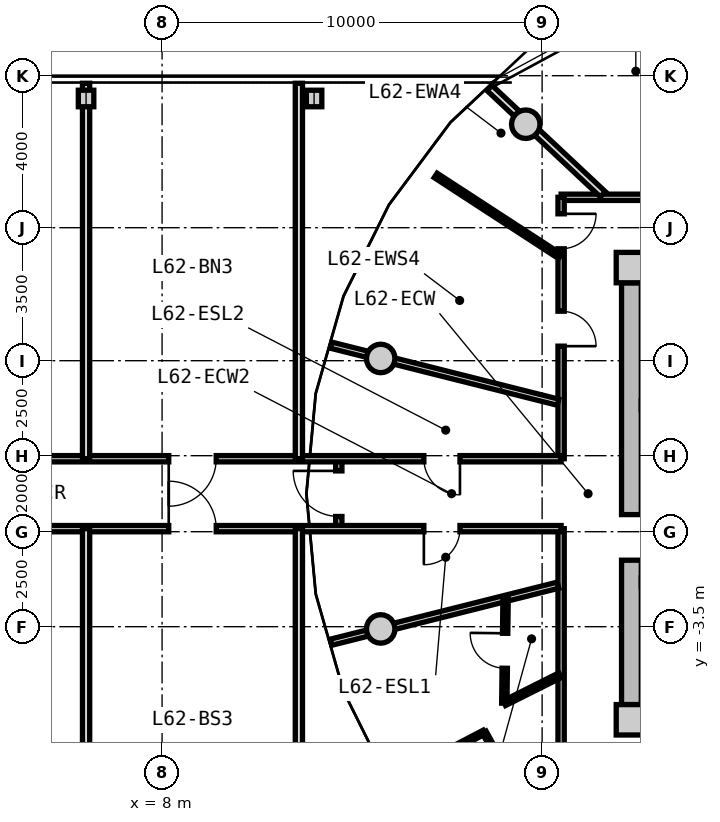
"""IFC4 building model, lengths in metres.
Left out: names, types, materials, properties, quantities, classifications, styles, units other than length and angle.
Written with IfcOpenShell. Run it as: python <this file> out.ifc"""

import sys

from ifc_helpers import new_model, si_unit, direction, frame, frame_2d, origin, origin_2d, place, context, subcontext, project, spatial, rectangle, circle, i_section, extrude, source, transform, mapped, element, fill, save


model = new_model("IFC4")
c1 = context("Model", 3, precision=1e-05, world=origin(), true_north=direction((0.0, 1.0)))
c2 = subcontext(c1, "Body", "Model", "MODEL_VIEW")
j1 = project(units=[si_unit("LENGTHUNIT", "METRE"), si_unit("PLANEANGLEUNIT", "RADIAN")], contexts=[c1])
p1 = place(None, origin())
s1 = spatial("IfcSite", under=j1, at=p1, CompositionType="ELEMENT")
p2 = place(p1, origin())
s2 = spatial("IfcBuilding", under=s1, at=p2, CompositionType="ELEMENT")
p3 = place(p2, frame((0.0, 0.0, 199.8)))
s3 = spatial("IfcBuildingStorey", under=s2, at=p3, CompositionType="ELEMENT", Elevation=199.8)
m1 = source(origin(), c2, "Body", "SweptSolid", [
    extrude(rectangle(XDim=0.8, YDim=0.8, at=origin_2d()), origin(), (0.0, 0.0, 1.0), 4.0),
])
for number, where, z_axis, x_axis in (
    (1, (20.35, -5.95, 0.0), (0.0, 0.0, 1.0), (1.0, 0.0, 0.0)),
    (2, (20.35, 5.95, 0.0), (0.0, 0.0, 1.0), (1.0, 0.0, 0.0)),
):
    element("IfcColumn", number, at=place(p3, frame(where, z_axis=z_axis, x_axis=x_axis)), inside=s3, PredefinedType="COLUMN", context=c2, shape_type="MappedRepresentation", body=[
        mapped(m1, transform((0.0, 0.0, 0.0), x_axis=(1.0, 0.0, 0.0), y_axis=(0.0, 1.0, 0.0), z_axis=(0.0, 0.0, 1.0), scale=1.0)),
    ])
m2 = source(origin(), c2, "Body", "SweptSolid", [
    extrude(rectangle(XDim=11.1, YDim=0.52, at=frame_2d((5.55, 0.0))), origin(), (0.0, 0.0, 1.0), 3.71),
])
p4 = place(p3, frame((20.35, -5.55, 0.0), z_axis=(0.0, 0.0, 1.0), x_axis=(0.0, 1.0, 0.0)))
e3 = element("IfcWall", 3, at=p4, inside=s3, PredefinedType="SHEAR", context=c2, shape_type="MappedRepresentation", body=[
    mapped(m2, transform((0.0, 0.0, 0.0), x_axis=(1.0, 0.0, 0.0), y_axis=(0.0, 1.0, 0.0), z_axis=(0.0, 0.0, 1.0), scale=1.0)),
])
p5 = place(p4, frame((3.8, 0.0, 0.0)))
e4 = element("IfcOpeningElement", 4, at=p5, cuts=e3, PredefinedType="OPENING", context=c2, shape_type="SweptSolid", body=[
    extrude(rectangle(XDim=1.2, YDim=2.15, at=frame_2d((0.6, 1.075))), frame((0.0, 0.27, 0.0), z_axis=(0.0, -1.0, 0.0), x_axis=(1.0, 0.0, 0.0)), (0.0, 0.0, 1.0), 0.54),
])
m3 = source(origin(), c2, "Body", "SweptSolid", [
    extrude(circle(Radius=0.375, at=origin_2d()), origin(), (0.0, 0.0, 1.0), 4.0),
])
for number, where, z_axis, x_axis in (
    (5, (17.57, 9.723, 0.0), (0.0, 0.0, 1.0), (1.0, 0.0, 0.0)),
    (6, (13.753, 3.559, 0.0), (0.0, 0.0, 1.0), (1.0, 0.0, 0.0)),
    (7, (13.753, -3.559, 0.0), (0.0, 0.0, 1.0), (1.0, 0.0, 0.0)),
):
    element("IfcColumn", number, at=place(p3, frame(where, z_axis=z_axis, x_axis=x_axis)), inside=s3, PredefinedType="COLUMN", context=c2, shape_type="MappedRepresentation", body=[
        mapped(m3, transform((0.0, 0.0, 0.0), x_axis=(1.0, 0.0, 0.0), y_axis=(0.0, 1.0, 0.0), z_axis=(0.0, 0.0, 1.0), scale=1.0)),
    ])
m4 = source(origin(), c2, "Body", "SweptSolid", [
    extrude(i_section(OverallWidth=0.407, OverallDepth=0.435, WebThickness=0.024, FlangeThickness=0.039, FilletRadius=0.015, at=origin_2d()), origin(), (0.0, 0.0, 1.0), 4.42),
])
for number, where, z_axis, x_axis in (
    (8, (6.0, 10.4, -0.42), (0.0, 0.0, 1.0), (1.0, 0.0, 0.0)),
    (9, (12.0, 10.4, -0.42), (0.0, 0.0, 1.0), (1.0, 0.0, 0.0)),
):
    element("IfcColumn", number, at=place(p3, frame(where, z_axis=z_axis, x_axis=x_axis)), inside=s3, PredefinedType="COLUMN", context=c2, shape_type="MappedRepresentation", body=[
        mapped(m4, transform((0.0, 0.0, 0.0), x_axis=(1.0, 0.0, 0.0), y_axis=(0.0, 1.0, 0.0), z_axis=(0.0, 0.0, 1.0), scale=1.0)),
    ])
m5 = source(origin(), c2, "Body", "SweptSolid", [
    extrude(rectangle(XDim=8.58, YDim=0.165, at=frame_2d((4.29, 0.0))), origin(), (0.0, 0.0, 1.0), 3.695),
])
p6 = place(p3, frame((18.5, 7.8, 0.0), z_axis=(0.0, 0.0, 1.0), x_axis=(1.0, 0.0, 0.0)))
e10 = element("IfcWall", 10, at=p6, inside=s3, PredefinedType="PARTITIONING", context=c2, shape_type="MappedRepresentation", body=[
    mapped(m5, transform((0.0, 0.0, 0.0), x_axis=(1.0, 0.0, 0.0), y_axis=(0.0, 1.0, 0.0), z_axis=(0.0, 0.0, 1.0), scale=1.0)),
])
p7 = place(p6, frame((2.515, 0.0, 0.0)))
e11 = element("IfcOpeningElement", 11, at=p7, cuts=e10, PredefinedType="OPENING", context=c2, shape_type="SweptSolid", body=[
    extrude(rectangle(XDim=1.05, YDim=2.15, at=frame_2d((0.525, 1.075))), frame((0.0, 0.093, 0.0), z_axis=(0.0, -1.0, 0.0), x_axis=(1.0, 0.0, 0.0)), (0.0, 0.0, 1.0), 0.185),
])
m6 = source(origin(), c2, "Body", "SweptSolid", [
    extrude(rectangle(XDim=6.88, YDim=0.165, at=frame_2d((3.44, 0.0))), origin(), (0.0, 0.0, 1.0), 3.695),
])
p8 = place(p3, frame((18.5, -7.8, 0.0), z_axis=(0.0, 0.0, 1.0), x_axis=(0.0, 1.0, 0.0)))
e12 = element("IfcWall", 12, at=p8, inside=s3, PredefinedType="PARTITIONING", context=c2, shape_type="MappedRepresentation", body=[
    mapped(m6, transform((0.0, 0.0, 0.0), x_axis=(1.0, 0.0, 0.0), y_axis=(0.0, 1.0, 0.0), z_axis=(0.0, 0.0, 1.0), scale=1.0)),
])
p9 = place(p3, frame((18.5, 0.92, 0.0), z_axis=(0.0, 0.0, 1.0), x_axis=(0.0, 1.0, 0.0)))
e13 = element("IfcWall", 13, at=p9, inside=s3, PredefinedType="PARTITIONING", context=c2, shape_type="MappedRepresentation", body=[
    mapped(m6, transform((0.0, 0.0, 0.0), x_axis=(1.0, 0.0, 0.0), y_axis=(0.0, 1.0, 0.0), z_axis=(0.0, 0.0, 1.0), scale=1.0)),
])
p10 = place(p9, frame((5.525, 0.0, 0.0)))
e14 = element("IfcOpeningElement", 14, at=p10, cuts=e13, PredefinedType="OPENING", context=c2, shape_type="SweptSolid", body=[
    extrude(rectangle(XDim=0.92, YDim=2.1, at=frame_2d((0.46, 1.05))), frame((0.0, 0.093, 0.0), z_axis=(0.0, -1.0, 0.0), x_axis=(1.0, 0.0, 0.0)), (0.0, 0.0, 1.0), 0.185),
])
p11 = place(p9, frame((2.962, 0.0, 0.0)))
e15 = element("IfcOpeningElement", 15, at=p11, cuts=e13, PredefinedType="OPENING", context=c2, shape_type="SweptSolid", body=[
    extrude(rectangle(XDim=0.92, YDim=2.1, at=frame_2d((0.46, 1.05))), frame((0.0, 0.093, 0.0), z_axis=(0.0, -1.0, 0.0), x_axis=(1.0, 0.0, 0.0)), (0.0, 0.0, 1.0), 0.185),
])
m7 = source(origin(), c2, "Body", "SweptSolid", [
    extrude(rectangle(XDim=6.157, YDim=0.165, at=frame_2d((3.079, 0.0))), origin(), (0.0, 0.0, 1.0), 3.295),
])
for number, where, z_axis, x_axis in (
    (16, (18.42, 2.407, 0.0), (0.0, 0.0, 1.0), (-0.97, 0.244, 0.0)),
    (17, (18.42, -2.407, 0.0), (0.0, 0.0, 1.0), (-0.97, -0.244, 0.0)),
):
    element("IfcWall", number, at=place(p3, frame(where, z_axis=z_axis, x_axis=x_axis)), inside=s3, PredefinedType="PARTITIONING", context=c2, shape_type="MappedRepresentation", body=[
        mapped(m7, transform((0.0, 0.0, 0.0), x_axis=(1.0, 0.0, 0.0), y_axis=(0.0, 1.0, 0.0), z_axis=(0.0, 0.0, 1.0), scale=1.0)),
    ])
m8 = source(origin(), c2, "Body", "SweptSolid", [
    extrude(rectangle(XDim=4.089, YDim=0.19, at=frame_2d((2.044, 0.0))), origin(), (0.0, 0.0, 1.0), 3.295),
])
p12 = place(p3, frame((19.598, 7.88, 0.0), z_axis=(0.0, 0.0, 1.0), x_axis=(-0.729401273609, 0.684086092577, 0.0)))
e18 = element("IfcWall", 18, at=p12, inside=s3, PredefinedType="PARTITIONING", context=c2, shape_type="MappedRepresentation", body=[
    mapped(m8, transform((0.0, 0.0, 0.0), x_axis=(1.0, 0.0, 0.0), y_axis=(0.0, 1.0, 0.0), z_axis=(0.0, 0.0, 1.0), scale=1.0)),
])
m9 = source(origin(), c2, "Body", "SweptSolid", [
    extrude(rectangle(XDim=3.904, YDim=0.14, at=frame_2d((1.952, 0.0))), origin(), (0.0, 0.0, 1.0), 3.695),
])
p13 = place(p3, frame((18.47, 6.246, 0.0), z_axis=(0.0, 0.0, 1.0), x_axis=(-0.838024687996, 0.545632314209, 0.0)))
e19 = element("IfcWall", 19, at=p13, inside=s3, PredefinedType="PARTITIONING", context=c2, shape_type="MappedRepresentation", body=[
    mapped(m9, transform((0.0, 0.0, 0.0), x_axis=(1.0, 0.0, 0.0), y_axis=(0.0, 1.0, 0.0), z_axis=(0.0, 0.0, 1.0), scale=1.0)),
])
m10 = source(origin(), c2, "Body", "SweptSolid", [
    extrude(rectangle(XDim=1.638, YDim=0.14, at=frame_2d((0.819, 0.0))), origin(), (0.0, 0.0, 1.0), 3.695),
])
p14 = place(p3, frame((18.47, -4.778, 0.0), z_axis=(0.0, 0.0, 1.0), x_axis=(-0.893919977945, -0.448226586707, 0.0)))
e20 = element("IfcWall", 20, at=p14, inside=s3, PredefinedType="PARTITIONING", context=c2, shape_type="MappedRepresentation", body=[
    mapped(m10, transform((0.0, 0.0, 0.0), x_axis=(1.0, 0.0, 0.0), y_axis=(0.0, 1.0, 0.0), z_axis=(0.0, 0.0, 1.0), scale=1.0)),
])
m11 = source(origin(), c2, "Body", "SweptSolid", [
    extrude(rectangle(XDim=2.759, YDim=0.14, at=frame_2d((1.379, 0.0))), origin(), (0.0, 0.0, 1.0), 3.695),
])
p15 = place(p3, frame((17.005, -5.513, 0.0), z_axis=(0.0, 0.0, 1.0), x_axis=(0.01194710728, 0.999928630767, 0.0)))
e21 = element("IfcWall", 21, at=p15, inside=s3, PredefinedType="PARTITIONING", context=c2, shape_type="MappedRepresentation", body=[
    mapped(m11, transform((0.0, 0.0, 0.0), x_axis=(1.0, 0.0, 0.0), y_axis=(0.0, 1.0, 0.0), z_axis=(0.0, 0.0, 1.0), scale=1.0)),
])
p16 = place(p15, frame((0.919, 0.0, 0.0)))
e22 = element("IfcOpeningElement", 22, at=p16, cuts=e21, PredefinedType="OPENING", context=c2, shape_type="SweptSolid", body=[
    extrude(rectangle(XDim=0.92, YDim=2.1, at=frame_2d((0.46, 1.05))), frame((0.0, 0.08, 0.0), z_axis=(0.0, -1.0, 0.0), x_axis=(1.0, 0.0, 0.0)), (0.0, 0.0, 1.0), 0.16),
])
m12 = source(origin(), c2, "Body", "SweptSolid", [
    extrude(rectangle(XDim=2.193, YDim=0.115, at=frame_2d((1.097, 0.0))), origin(), (0.0, 0.0, 1.0), 3.695),
])
p17 = place(p3, frame((16.475, -6.275, 0.0), z_axis=(0.0, 0.0, 1.0), x_axis=(-0.885783595046, -0.464098505435, 0.0)))
e23 = element("IfcWall", 23, at=p17, inside=s3, PredefinedType="PARTITIONING", context=c2, shape_type="MappedRepresentation", body=[
    mapped(m12, transform((0.0, 0.0, 0.0), x_axis=(1.0, 0.0, 0.0), y_axis=(0.0, 1.0, 0.0), z_axis=(0.0, 0.0, 1.0), scale=1.0)),
])
m13 = source(origin(), c2, "Body", "SweptSolid", [
    extrude(rectangle(XDim=3.45, YDim=0.115, at=frame_2d((1.725, 0.0))), origin(), (0.0, 0.0, 1.0), 3.695),
])
p18 = place(p3, frame((16.475, -6.275, 0.0), z_axis=(0.0, 0.0, 1.0), x_axis=(0.483659007882, -0.875256513312, 0.0)))
e24 = element("IfcWall", 24, at=p18, inside=s3, PredefinedType="PARTITIONING", context=c2, shape_type="MappedRepresentation", body=[
    mapped(m13, transform((0.0, 0.0, 0.0), x_axis=(1.0, 0.0, 0.0), y_axis=(0.0, 1.0, 0.0), z_axis=(0.0, 0.0, 1.0), scale=1.0)),
])
p19 = place(p18, frame((1.25, 0.0, 0.0)))
e25 = element("IfcOpeningElement", 25, at=p19, cuts=e24, PredefinedType="OPENING", context=c2, shape_type="SweptSolid", body=[
    extrude(rectangle(XDim=0.95, YDim=2.1, at=frame_2d((0.475, 1.05))), frame((0.0, 0.067, 0.0), z_axis=(0.0, -1.0, 0.0), x_axis=(1.0, 0.0, 0.0)), (0.0, 0.0, 1.0), 0.135),
])
m14 = source(origin(), c2, "Body", "SweptSolid", [
    extrude(rectangle(XDim=1.84, YDim=0.165, at=frame_2d((0.92, 0.0))), origin(), (0.0, 0.0, 1.0), 3.695),
])
p20 = place(p3, frame((12.65, -0.92, 0.0), z_axis=(0.0, 0.0, 1.0), x_axis=(0.0, 1.0, 0.0)))
e26 = element("IfcWall", 26, at=p20, inside=s3, PredefinedType="PARTITIONING", context=c2, shape_type="MappedRepresentation", body=[
    mapped(m14, transform((0.0, 0.0, 0.0), x_axis=(1.0, 0.0, 0.0), y_axis=(0.0, 1.0, 0.0), z_axis=(0.0, 0.0, 1.0), scale=1.0)),
])
p21 = place(p20, frame((0.32, 0.0, 0.0)))
e27 = element("IfcOpeningElement", 27, at=p21, cuts=e26, PredefinedType="OPENING", context=c2, shape_type="SweptSolid", body=[
    extrude(rectangle(XDim=1.2, YDim=2.15, at=frame_2d((0.6, 1.075))), frame((0.0, 0.093, 0.0), z_axis=(0.0, -1.0, 0.0), x_axis=(1.0, 0.0, 0.0)), (0.0, 0.0, 1.0), 0.185),
])
m15 = source(origin(), c2, "Body", "SweptSolid", [
    extrude(rectangle(XDim=37.0, YDim=0.165, at=frame_2d((18.5, 0.0))), origin(), (0.0, 0.0, 1.0), 3.695),
])
p22 = place(p3, frame((-18.5, -0.92, 0.0), z_axis=(0.0, 0.0, 1.0), x_axis=(1.0, 0.0, 0.0)))
e28 = element("IfcWall", 28, at=p22, inside=s3, PredefinedType="PARTITIONING", context=c2, shape_type="MappedRepresentation", body=[
    mapped(m15, transform((0.0, 0.0, 0.0), x_axis=(1.0, 0.0, 0.0), y_axis=(0.0, 1.0, 0.0), z_axis=(0.0, 0.0, 1.0), scale=1.0)),
])
p23 = place(p22, frame((2.662, 0.0, 0.0)))
e29 = element("IfcOpeningElement", 29, at=p23, cuts=e28, PredefinedType="OPENING", context=c2, shape_type="SweptSolid", body=[
    extrude(rectangle(XDim=0.95, YDim=2.1, at=frame_2d((0.475, 1.05))), frame((0.0, 0.093, 0.0), z_axis=(0.0, -1.0, 0.0), x_axis=(1.0, 0.0, 0.0)), (0.0, 0.0, 1.0), 0.185),
])
p24 = place(p22, frame((33.388, 0.0, 0.0)))
e30 = element("IfcOpeningElement", 30, at=p24, cuts=e28, PredefinedType="OPENING", context=c2, shape_type="SweptSolid", body=[
    extrude(rectangle(XDim=0.95, YDim=2.1, at=frame_2d((0.475, 1.05))), frame((0.0, 0.093, 0.0), z_axis=(0.0, -1.0, 0.0), x_axis=(1.0, 0.0, 0.0)), (0.0, 0.0, 1.0), 0.185),
])
p25 = place(p22, frame((9.075, 0.0, 0.0)))
e31 = element("IfcOpeningElement", 31, at=p25, cuts=e28, PredefinedType="OPENING", context=c2, shape_type="SweptSolid", body=[
    extrude(rectangle(XDim=1.25, YDim=2.2, at=frame_2d((0.625, 1.1))), frame((0.0, 0.093, 0.0), z_axis=(0.0, -1.0, 0.0), x_axis=(1.0, 0.0, 0.0)), (0.0, 0.0, 1.0), 0.185),
])
p26 = place(p22, frame((17.875, 0.0, 0.0)))
e32 = element("IfcOpeningElement", 32, at=p26, cuts=e28, PredefinedType="OPENING", context=c2, shape_type="SweptSolid", body=[
    extrude(rectangle(XDim=1.25, YDim=2.2, at=frame_2d((0.625, 1.1))), frame((0.0, 0.093, 0.0), z_axis=(0.0, -1.0, 0.0), x_axis=(1.0, 0.0, 0.0)), (0.0, 0.0, 1.0), 0.185),
])
p27 = place(p22, frame((26.675, 0.0, 0.0)))
e33 = element("IfcOpeningElement", 33, at=p27, cuts=e28, PredefinedType="OPENING", context=c2, shape_type="SweptSolid", body=[
    extrude(rectangle(XDim=1.25, YDim=2.2, at=frame_2d((0.625, 1.1))), frame((0.0, 0.093, 0.0), z_axis=(0.0, -1.0, 0.0), x_axis=(1.0, 0.0, 0.0)), (0.0, 0.0, 1.0), 0.185),
])
p28 = place(p3, frame((-18.5, 0.92, 0.0), z_axis=(0.0, 0.0, 1.0), x_axis=(1.0, 0.0, 0.0)))
e34 = element("IfcWall", 34, at=p28, inside=s3, PredefinedType="PARTITIONING", context=c2, shape_type="MappedRepresentation", body=[
    mapped(m15, transform((0.0, 0.0, 0.0), x_axis=(1.0, 0.0, 0.0), y_axis=(0.0, 1.0, 0.0), z_axis=(0.0, 0.0, 1.0), scale=1.0)),
])
p29 = place(p28, frame((2.662, 0.0, 0.0)))
e35 = element("IfcOpeningElement", 35, at=p29, cuts=e34, PredefinedType="OPENING", context=c2, shape_type="SweptSolid", body=[
    extrude(rectangle(XDim=0.95, YDim=2.1, at=frame_2d((0.475, 1.05))), frame((0.0, 0.093, 0.0), z_axis=(0.0, -1.0, 0.0), x_axis=(1.0, 0.0, 0.0)), (0.0, 0.0, 1.0), 0.185),
])
p30 = place(p28, frame((33.388, 0.0, 0.0)))
e36 = element("IfcOpeningElement", 36, at=p30, cuts=e34, PredefinedType="OPENING", context=c2, shape_type="SweptSolid", body=[
    extrude(rectangle(XDim=0.95, YDim=2.1, at=frame_2d((0.475, 1.05))), frame((0.0, 0.093, 0.0), z_axis=(0.0, -1.0, 0.0), x_axis=(1.0, 0.0, 0.0)), (0.0, 0.0, 1.0), 0.185),
])
p31 = place(p28, frame((7.64, 0.0, 0.0)))
e37 = element("IfcOpeningElement", 37, at=p31, cuts=e34, PredefinedType="OPENING", context=c2, shape_type="SweptSolid", body=[
    extrude(rectangle(XDim=0.92, YDim=2.1, at=frame_2d((0.46, 1.05))), frame((0.0, 0.093, 0.0), z_axis=(0.0, -1.0, 0.0), x_axis=(1.0, 0.0, 0.0)), (0.0, 0.0, 1.0), 0.185),
])
p32 = place(p28, frame((10.275, 0.0, 0.0)))
e38 = element("IfcOpeningElement", 38, at=p32, cuts=e34, PredefinedType="OPENING", context=c2, shape_type="SweptSolid", body=[
    extrude(rectangle(XDim=1.25, YDim=2.2, at=frame_2d((0.625, 1.1))), frame((0.0, 0.093, 0.0), z_axis=(0.0, -1.0, 0.0), x_axis=(1.0, 0.0, 0.0)), (0.0, 0.0, 1.0), 0.185),
])
p33 = place(p28, frame((17.875, 0.0, 0.0)))
e39 = element("IfcOpeningElement", 39, at=p33, cuts=e34, PredefinedType="OPENING", context=c2, shape_type="SweptSolid", body=[
    extrude(rectangle(XDim=1.25, YDim=2.2, at=frame_2d((0.625, 1.1))), frame((0.0, 0.093, 0.0), z_axis=(0.0, -1.0, 0.0), x_axis=(1.0, 0.0, 0.0)), (0.0, 0.0, 1.0), 0.185),
])
p34 = place(p28, frame((26.675, 0.0, 0.0)))
e40 = element("IfcOpeningElement", 40, at=p34, cuts=e34, PredefinedType="OPENING", context=c2, shape_type="SweptSolid", body=[
    extrude(rectangle(XDim=1.25, YDim=2.2, at=frame_2d((0.625, 1.1))), frame((0.0, 0.093, 0.0), z_axis=(0.0, -1.0, 0.0), x_axis=(1.0, 0.0, 0.0)), (0.0, 0.0, 1.0), 0.185),
])
m16 = source(origin(), c2, "Body", "SweptSolid", [
    extrude(rectangle(XDim=9.88, YDim=0.19, at=frame_2d((4.94, 0.0))), origin(), (0.0, 0.0, 1.0), 3.695),
])
for number, where, z_axis, x_axis in (
    (41, (11.6, -10.8, 0.0), (0.0, 0.0, 1.0), (0.0, 1.0, 0.0)),
    (42, (11.6, 0.92, 0.0), (0.0, 0.0, 1.0), (0.0, 1.0, 0.0)),
):
    element("IfcWall", number, at=place(p3, frame(where, z_axis=z_axis, x_axis=x_axis)), inside=s3, PredefinedType="PARTITIONING", context=c2, shape_type="MappedRepresentation", body=[
        mapped(m16, transform((0.0, 0.0, 0.0), x_axis=(1.0, 0.0, 0.0), y_axis=(0.0, 1.0, 0.0), z_axis=(0.0, 0.0, 1.0), scale=1.0)),
    ])
m17 = source(origin(), c2, "Body", "SweptSolid", [
    extrude(rectangle(XDim=9.88, YDim=0.19, at=frame_2d((4.94, 0.0))), origin(), (0.0, 0.0, 1.0), 2.995),
])
for number, where, z_axis, x_axis in (
    (43, (6.0, -10.8, 0.0), (0.0, 0.0, 1.0), (0.0, 1.0, 0.0)),
    (44, (6.0, 0.92, 0.0), (0.0, 0.0, 1.0), (0.0, 1.0, 0.0)),
):
    element("IfcWall", number, at=place(p3, frame(where, z_axis=z_axis, x_axis=x_axis)), inside=s3, PredefinedType="PARTITIONING", context=c2, shape_type="MappedRepresentation", body=[
        mapped(m17, transform((0.0, 0.0, 0.0), x_axis=(1.0, 0.0, 0.0), y_axis=(0.0, 1.0, 0.0), z_axis=(0.0, 0.0, 1.0), scale=1.0)),
    ])
m18 = source(origin(), c2, "Body", "SweptSolid", [
    extrude(rectangle(XDim=1.2, YDim=2.15, at=frame_2d((0.6, 1.075))), frame((0.0, 0.025, 0.0), z_axis=(0.0, -1.0, 0.0), x_axis=(1.0, 0.0, 0.0)), (0.0, 0.0, 1.0), 0.05),
])
p35 = place(p5, frame((1.2, 0.0, 0.0), z_axis=(0.0, 0.0, 1.0), x_axis=(-1.0, 0.0, 0.0)))
e45 = element("IfcDoor", 45, at=p35, inside=s3, OperationType="SINGLE_SWING_LEFT", PredefinedType="DOOR", context=c2, shape_type="MappedRepresentation", body=[
    mapped(m18, transform((0.0, 0.0, 0.0), x_axis=(1.0, 0.0, 0.0), y_axis=(0.0, 1.0, 0.0), z_axis=(0.0, 0.0, 1.0), scale=1.0)),
])
fill(e4, e45)
m19 = source(origin(), c2, "Body", "SweptSolid", [
    extrude(rectangle(XDim=0.95, YDim=2.1, at=frame_2d((0.475, 1.05))), frame((0.0, 0.025, 0.0), z_axis=(0.0, -1.0, 0.0), x_axis=(1.0, 0.0, 0.0)), (0.0, 0.0, 1.0), 0.05),
])
p36 = place(p24, frame((0.95, 0.0, 0.0), z_axis=(0.0, 0.0, 1.0), x_axis=(-1.0, 0.0, 0.0)))
e46 = element("IfcDoor", 46, at=p36, inside=s3, OperationType="SINGLE_SWING_RIGHT", PredefinedType="DOOR", context=c2, shape_type="MappedRepresentation", body=[
    mapped(m19, transform((0.0, 0.0, 0.0), x_axis=(1.0, 0.0, 0.0), y_axis=(0.0, 1.0, 0.0), z_axis=(0.0, 0.0, 1.0), scale=1.0)),
])
fill(e30, e46)
p37 = place(p30, frame((0.95, 0.0, 0.0), z_axis=(0.0, 0.0, 1.0), x_axis=(-1.0, 0.0, 0.0)))
e47 = element("IfcDoor", 47, at=p37, inside=s3, OperationType="SINGLE_SWING_LEFT", PredefinedType="DOOR", context=c2, shape_type="MappedRepresentation", body=[
    mapped(m19, transform((0.0, 0.0, 0.0), x_axis=(1.0, 0.0, 0.0), y_axis=(0.0, 1.0, 0.0), z_axis=(0.0, 0.0, 1.0), scale=1.0)),
])
fill(e36, e47)
m20 = source(origin(), c2, "Body", "SweptSolid", [
    extrude(rectangle(XDim=0.92, YDim=2.1, at=frame_2d((0.46, 1.05))), frame((0.0, 0.025, 0.0), z_axis=(0.0, -1.0, 0.0), x_axis=(1.0, 0.0, 0.0)), (0.0, 0.0, 1.0), 0.05),
])
p38 = place(p10, frame((0.92, 0.0, 0.0), z_axis=(0.0, 0.0, 1.0), x_axis=(-1.0, 0.0, 0.0)))
e48 = element("IfcDoor", 48, at=p38, inside=s3, OperationType="SINGLE_SWING_LEFT", PredefinedType="DOOR", context=c2, shape_type="MappedRepresentation", body=[
    mapped(m20, transform((0.0, 0.0, 0.0), x_axis=(1.0, 0.0, 0.0), y_axis=(0.0, 1.0, 0.0), z_axis=(0.0, 0.0, 1.0), scale=1.0)),
])
fill(e14, e48)
p39 = place(p11, frame((0.92, 0.0, 0.0), z_axis=(0.0, 0.0, 1.0), x_axis=(-1.0, 0.0, 0.0)))
e49 = element("IfcDoor", 49, at=p39, inside=s3, OperationType="SINGLE_SWING_RIGHT", PredefinedType="DOOR", context=c2, shape_type="MappedRepresentation", body=[
    mapped(m20, transform((0.0, 0.0, 0.0), x_axis=(1.0, 0.0, 0.0), y_axis=(0.0, 1.0, 0.0), z_axis=(0.0, 0.0, 1.0), scale=1.0)),
])
fill(e15, e49)
p40 = place(p16, origin())
e50 = element("IfcDoor", 50, at=p40, inside=s3, OperationType="SINGLE_SWING_RIGHT", PredefinedType="DOOR", context=c2, shape_type="MappedRepresentation", body=[
    mapped(m20, transform((0.0, 0.0, 0.0), x_axis=(1.0, 0.0, 0.0), y_axis=(0.0, 1.0, 0.0), z_axis=(0.0, 0.0, 1.0), scale=1.0)),
])
fill(e22, e50)
p41 = place(p21, origin())
e51 = element("IfcDoor", 51, at=p41, inside=s3, OperationType="SINGLE_SWING_RIGHT", PredefinedType="DOOR", context=c2, shape_type="MappedRepresentation", body=[
    mapped(m18, transform((0.0, 0.0, 0.0), x_axis=(1.0, 0.0, 0.0), y_axis=(0.0, 1.0, 0.0), z_axis=(0.0, 0.0, 1.0), scale=1.0)),
])
fill(e27, e51)
m21 = source(origin(), c2, "Body", "SweptSolid", [
    extrude(rectangle(XDim=1.25, YDim=2.2, at=frame_2d((0.625, 1.1))), frame((0.0, 0.025, 0.0), z_axis=(0.0, -1.0, 0.0), x_axis=(1.0, 0.0, 0.0)), (0.0, 0.0, 1.0), 0.05),
])
p42 = place(p27, origin())
e52 = element("IfcDoor", 52, at=p42, inside=s3, OperationType="SINGLE_SWING_LEFT", PredefinedType="DOOR", context=c2, shape_type="MappedRepresentation", body=[
    mapped(m21, transform((0.0, 0.0, 0.0), x_axis=(1.0, 0.0, 0.0), y_axis=(0.0, 1.0, 0.0), z_axis=(0.0, 0.0, 1.0), scale=1.0)),
])
fill(e33, e52)
p43 = place(p34, frame((1.25, 0.0, 0.0), z_axis=(0.0, 0.0, 1.0), x_axis=(-1.0, 0.0, 0.0)))
e53 = element("IfcDoor", 53, at=p43, inside=s3, OperationType="SINGLE_SWING_RIGHT", PredefinedType="DOOR", context=c2, shape_type="MappedRepresentation", body=[
    mapped(m21, transform((0.0, 0.0, 0.0), x_axis=(1.0, 0.0, 0.0), y_axis=(0.0, 1.0, 0.0), z_axis=(0.0, 0.0, 1.0), scale=1.0)),
])
fill(e40, e53)
save(model, sys.argv[1])
